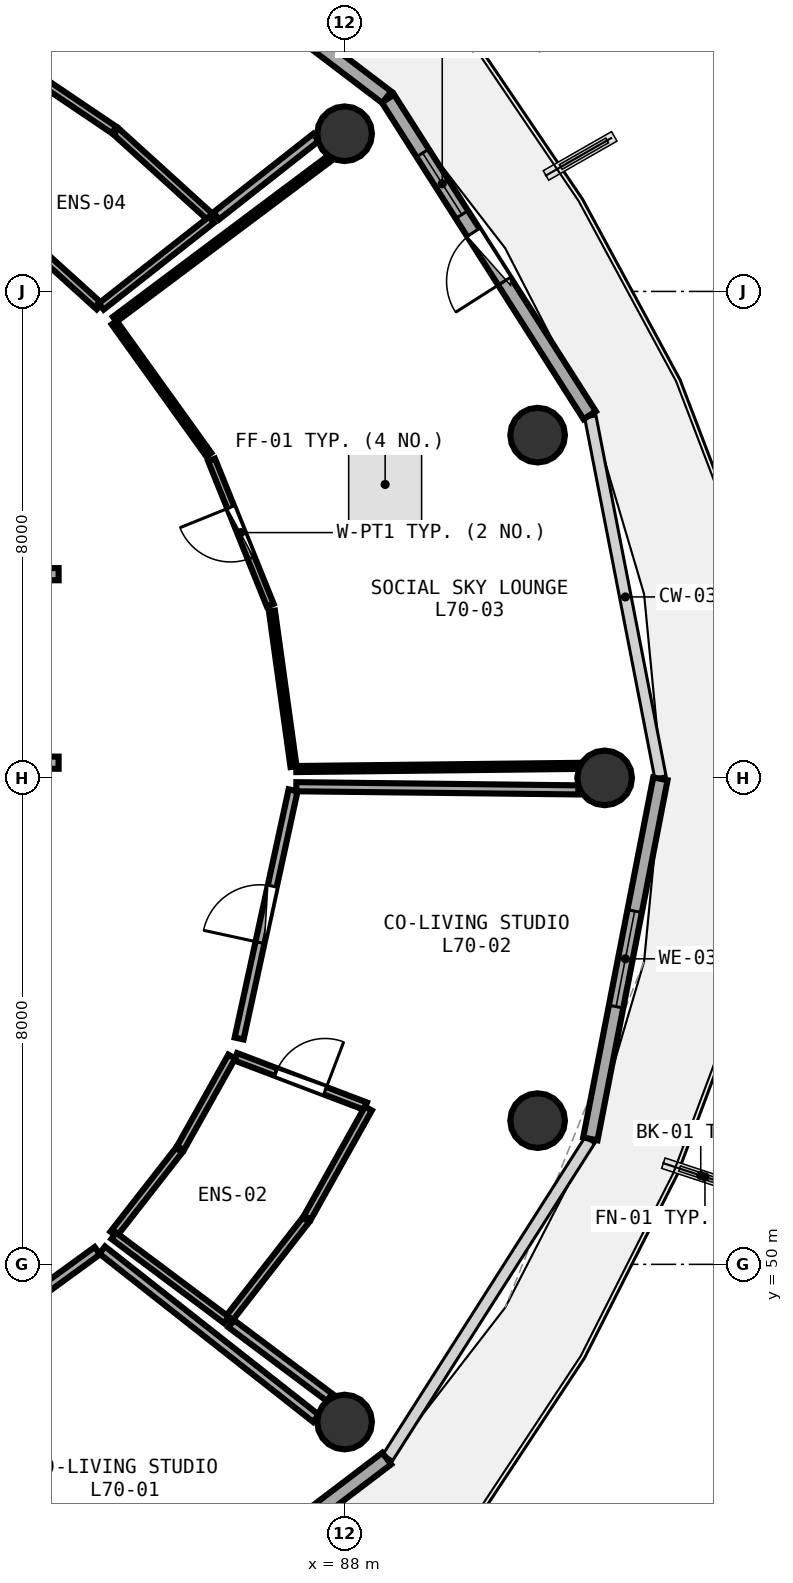
"""IFC4 building model, lengths in metres.
Left out: names, types, materials, properties, quantities, classifications, styles, units other than length and angle.
Written with IfcOpenShell. Run it as: python <this file> out.ifc"""

import sys

from ifc_helpers import new_model, si_unit, direction, frame, frame_2d, origin, origin_2d, place, context, subcontext, project, spatial, rectangle, circle, extrude, element, fill, save


model = new_model("IFC4")
c1 = context("Model", 3, precision=1e-05, world=origin(), true_north=direction((0.0, 1.0)))
c2 = subcontext(c1, "Body", "Model", "MODEL_VIEW")
j1 = project(units=[si_unit("LENGTHUNIT", "METRE"), si_unit("PLANEANGLEUNIT", "RADIAN")], contexts=[c1])
p1 = place(None, origin())
s1 = spatial("IfcSite", under=j1, at=p1, CompositionType="ELEMENT")
p2 = place(p1, origin())
s2 = spatial("IfcBuilding", under=s1, at=p2, CompositionType="ELEMENT")
p3 = place(p2, frame((0.0, 0.0, 274.95)))
s3 = spatial("IfcBuildingStorey", under=s2, at=p3, CompositionType="ELEMENT", Elevation=274.95)
for number, where, z_axis, x_axis in (
    (1, (92.28, 58.0, 0.0), (0.0, 0.0, 1.0), (1.0, 0.0, 0.0)),
    (2, (91.177, 63.636, 0.0), (0.0, 0.0, 1.0), (1.0, 0.0, 0.0)),
    (3, (88.003, 68.593, 0.0), (0.0, 0.0, 1.0), (1.0, 0.0, 0.0)),
    (4, (88.003, 47.407, 0.0), (0.0, 0.0, 1.0), (1.0, 0.0, 0.0)),
    (5, (91.177, 52.364, 0.0), (0.0, 0.0, 1.0), (1.0, 0.0, 0.0)),
):
    element("IfcColumn", number, at=place(p3, frame(where, z_axis=z_axis, x_axis=x_axis)), inside=s3, PredefinedType="COLUMN", context=c2, shape_type="SweptSolid", body=[
        extrude(circle(Radius=0.45, at=origin_2d()), origin(), (0.0, 0.0, 1.0), 3.75),
    ])
p4 = place(p3, frame((92.034, 63.964, 0.0), z_axis=(0.0, 0.0, 1.0), x_axis=(-0.537271968456, 0.843409053728, 0.0)))
e6 = element("IfcWall", 6, at=p4, inside=s3, PredefinedType="SOLIDWALL", context=c2, shape_type="SweptSolid", body=[
    extrude(rectangle(XDim=6.175, YDim=0.24, at=frame_2d((3.087, 0.0))), origin(), (0.0, 0.0, 1.0), 3.475),
])
p5 = place(p4, frame((2.613, 0.0, 0.0)))
e7 = element("IfcOpeningElement", 7, at=p5, cuts=e6, PredefinedType="OPENING", context=c2, shape_type="SweptSolid", body=[
    extrude(rectangle(XDim=0.95, YDim=2.1, at=frame_2d((0.475, 1.05))), frame((0.0, 0.13, 0.0), z_axis=(0.0, -1.0, 0.0), x_axis=(1.0, 0.0, 0.0)), (0.0, 0.0, 1.0), 0.26),
])
p6 = place(p4, frame((3.913, 0.0, 0.85)))
e8 = element("IfcOpeningElement", 8, at=p6, cuts=e6, PredefinedType="OPENING", context=c2, shape_type="SweptSolid", body=[
    extrude(rectangle(XDim=1.2, YDim=1.45, at=frame_2d((0.6, 0.725))), frame((0.0, 0.13, 0.0), z_axis=(0.0, -1.0, 0.0), x_axis=(1.0, 0.0, 0.0)), (0.0, 0.0, 1.0), 0.26),
])
p7 = place(p3, frame((88.696, 69.194, 0.0), z_axis=(0.0, 0.0, 1.0), x_axis=(-0.796010444211, 0.605282886514, 0.0)))
e9 = element("IfcWall", 9, at=p7, inside=s3, PredefinedType="SOLIDWALL", context=c2, shape_type="SweptSolid", body=[
    extrude(rectangle(XDim=6.387, YDim=0.24, at=frame_2d((3.194, 0.0))), origin(), (0.0, 0.0, 1.0), 3.475),
])
p8 = place(p7, frame((2.719, 0.0, 0.0)))
e10 = element("IfcOpeningElement", 10, at=p8, cuts=e9, PredefinedType="OPENING", context=c2, shape_type="SweptSolid", body=[
    extrude(rectangle(XDim=0.95, YDim=2.1, at=frame_2d((0.475, 1.05))), frame((0.0, 0.13, 0.0), z_axis=(0.0, -1.0, 0.0), x_axis=(1.0, 0.0, 0.0)), (0.0, 0.0, 1.0), 0.26),
])
p9 = place(p7, frame((4.019, 0.0, 0.85)))
e11 = element("IfcOpeningElement", 11, at=p9, cuts=e9, PredefinedType="OPENING", context=c2, shape_type="SweptSolid", body=[
    extrude(rectangle(XDim=1.2, YDim=1.45, at=frame_2d((0.6, 0.725))), frame((0.0, 0.13, 0.0), z_axis=(0.0, -1.0, 0.0), x_axis=(1.0, 0.0, 0.0)), (0.0, 0.0, 1.0), 0.26),
])
p10 = place(p3, frame((83.612, 42.94, 0.0), z_axis=(0.0, 0.0, 1.0), x_axis=(0.796010444211, 0.605282886514, 0.0)))
e12 = element("IfcWall", 12, at=p10, inside=s3, PredefinedType="SOLIDWALL", context=c2, shape_type="SweptSolid", body=[
    extrude(rectangle(XDim=6.387, YDim=0.24, at=frame_2d((3.194, 0.0))), origin(), (0.0, 0.0, 1.0), 3.475),
])
p11 = place(p10, frame((2.394, 0.0, 0.85)))
e13 = element("IfcOpeningElement", 13, at=p11, cuts=e12, PredefinedType="OPENING", context=c2, shape_type="SweptSolid", body=[
    extrude(rectangle(XDim=1.6, YDim=1.45, at=frame_2d((0.8, 0.725))), frame((0.0, 0.13, 0.0), z_axis=(0.0, -1.0, 0.0), x_axis=(1.0, 0.0, 0.0)), (0.0, 0.0, 1.0), 0.26),
])
p12 = place(p3, frame((92.045, 52.063, 0.0), z_axis=(0.0, 0.0, 1.0), x_axis=(0.190969309115, 0.981596008028, 0.0)))
e14 = element("IfcWall", 14, at=p12, inside=s3, PredefinedType="SOLIDWALL", context=c2, shape_type="SweptSolid", body=[
    extrude(rectangle(XDim=6.033, YDim=0.24, at=frame_2d((3.017, 0.0))), origin(), (0.0, 0.0, 1.0), 3.475),
])
p13 = place(p12, frame((2.216, 0.0, 0.85)))
e15 = element("IfcOpeningElement", 15, at=p13, cuts=e14, PredefinedType="OPENING", context=c2, shape_type="SweptSolid", body=[
    extrude(rectangle(XDim=1.6, YDim=1.45, at=frame_2d((0.8, 0.725))), frame((0.0, 0.13, 0.0), z_axis=(0.0, -1.0, 0.0), x_axis=(1.0, 0.0, 0.0)), (0.0, 0.0, 1.0), 0.26),
])
p14 = place(p3, frame((79.3, 61.35, 0.0), z_axis=(0.0, 0.0, 1.0), x_axis=(1.0, 0.0, 0.0)))
e16 = element("IfcWall", 16, at=p14, inside=s3, PredefinedType="SOLIDWALL", context=c2, shape_type="SweptSolid", body=[
    extrude(rectangle(XDim=4.0, YDim=0.2, at=frame_2d((2.0, 0.0))), origin(), (0.0, 0.0, 1.0), 2.775),
])
p15 = place(p14, frame((0.45, 0.0, 0.0)))
e17 = element("IfcOpeningElement", 17, at=p15, cuts=e16, PredefinedType="OPENING", context=c2, shape_type="SweptSolid", body=[
    extrude(rectangle(XDim=1.2, YDim=2.15, at=frame_2d((0.6, 1.075))), frame((0.0, 0.11, 0.0), z_axis=(0.0, -1.0, 0.0), x_axis=(1.0, 0.0, 0.0)), (0.0, 0.0, 1.0), 0.22),
])
p16 = place(p3, frame((79.3, 58.25, 0.0), z_axis=(0.0, 0.0, 1.0), x_axis=(1.0, 0.0, 0.0)))
e18 = element("IfcWall", 18, at=p16, inside=s3, PredefinedType="SOLIDWALL", context=c2, shape_type="SweptSolid", body=[
    extrude(rectangle(XDim=4.0, YDim=0.2, at=frame_2d((2.0, 0.0))), origin(), (0.0, 0.0, 1.0), 2.775),
])
p17 = place(p16, frame((0.5, 0.0, 0.0)))
e19 = element("IfcOpeningElement", 19, at=p17, cuts=e18, PredefinedType="OPENING", context=c2, shape_type="SweptSolid", body=[
    extrude(rectangle(XDim=1.1, YDim=2.1, at=frame_2d((0.55, 1.05))), frame((0.0, 0.11, 0.0), z_axis=(0.0, -1.0, 0.0), x_axis=(1.0, 0.0, 0.0)), (0.0, 0.0, 1.0), 0.22),
])
p18 = place(p3, frame((80.34, 47.607, 0.0), z_axis=(0.0, 0.0, 1.0), x_axis=(0.808603155837, 0.588354430909, 0.0)))
e20 = element("IfcWall", 20, at=p18, inside=s3, PredefinedType="PARTITIONING", context=c2, shape_type="SweptSolid", body=[
    extrude(rectangle(XDim=4.448, YDim=0.15, at=frame_2d((2.224, 0.0))), origin(), (0.0, 0.0, 1.0), 3.075),
])
p19 = place(p18, frame((1.749, 0.0, 0.0)))
e21 = element("IfcOpeningElement", 21, at=p19, cuts=e20, PredefinedType="OPENING", context=c2, shape_type="SweptSolid", body=[
    extrude(rectangle(XDim=0.95, YDim=2.08, at=frame_2d((0.475, 1.04))), frame((0.0, 0.085, 0.0), z_axis=(0.0, -1.0, 0.0), x_axis=(1.0, 0.0, 0.0)), (0.0, 0.0, 1.0), 0.17),
])
p20 = place(p3, frame((86.213, 53.414, 0.0), z_axis=(0.0, 0.0, 1.0), x_axis=(0.934596057468, -0.355710850784, 0.0)))
e22 = element("IfcWall", 22, at=p20, inside=s3, PredefinedType="PLUMBINGWALL", context=c2, shape_type="SweptSolid", body=[
    extrude(rectangle(XDim=2.284, YDim=0.13, at=frame_2d((1.142, 0.0))), origin(), (0.0, 0.0, 1.0), 3.175),
])
p21 = place(p20, frame((0.712, 0.0, 0.0)))
e23 = element("IfcOpeningElement", 23, at=p21, cuts=e22, PredefinedType="OPENING", context=c2, shape_type="SweptSolid", body=[
    extrude(rectangle(XDim=0.86, YDim=2.05, at=frame_2d((0.43, 1.025))), frame((0.0, 0.075, 0.0), z_axis=(0.0, -1.0, 0.0), x_axis=(1.0, 0.0, 0.0)), (0.0, 0.0, 1.0), 0.15),
])
p22 = place(p3, frame((86.269, 53.715, 0.0), z_axis=(0.0, 0.0, 1.0), x_axis=(0.212453909159, 0.977171088645, 0.0)))
e24 = element("IfcWall", 24, at=p22, inside=s3, PredefinedType="PARTITIONING", context=c2, shape_type="SweptSolid", body=[
    extrude(rectangle(XDim=4.177, YDim=0.15, at=frame_2d((2.089, 0.0))), origin(), (0.0, 0.0, 1.0), 3.48),
])
p23 = place(p22, frame((1.614, 0.0, 0.0)))
e25 = element("IfcOpeningElement", 25, at=p23, cuts=e24, PredefinedType="OPENING", context=c2, shape_type="SweptSolid", body=[
    extrude(rectangle(XDim=0.95, YDim=2.08, at=frame_2d((0.475, 1.04))), frame((0.0, 0.085, 0.0), z_axis=(0.0, -1.0, 0.0), x_axis=(1.0, 0.0, 0.0)), (0.0, 0.0, 1.0), 0.17),
])
p24 = place(p3, frame((86.781, 60.84, 0.0), z_axis=(0.0, 0.0, 1.0), x_axis=(-0.374574284654, 0.927196907499, 0.0)))
e26 = element("IfcWall", 26, at=p24, inside=s3, PredefinedType="PARTITIONING", context=c2, shape_type="SweptSolid", body=[
    extrude(rectangle(XDim=2.576, YDim=0.12, at=frame_2d((1.288, 0.0))), origin(), (0.0, 0.0, 1.0), 3.48),
])
p25 = place(p24, frame((0.838, 0.0, 0.0)))
e27 = element("IfcOpeningElement", 27, at=p25, cuts=e26, PredefinedType="OPENING", context=c2, shape_type="SweptSolid", body=[
    extrude(rectangle(XDim=0.9, YDim=2.08, at=frame_2d((0.45, 1.04))), frame((0.0, 0.07, 0.0), z_axis=(0.0, -1.0, 0.0), x_axis=(1.0, 0.0, 0.0)), (0.0, 0.0, 1.0), 0.14),
])
p26 = place(p3, frame((84.016, 50.235, 0.0), z_axis=(0.0, 0.0, 1.0), x_axis=(0.785736749878, -0.618561039745, 0.0)))
e28 = element("IfcWall", 28, at=p26, inside=s3, PredefinedType="PARTITIONING", context=c2, shape_type="SweptSolid", body=[
    extrude(rectangle(XDim=4.475, YDim=0.15, at=frame_2d((2.237, 0.0))), origin(), (0.0, 0.0, 1.0), 3.075),
])
p27 = place(p3, frame((84.203, 50.498, 0.0), z_axis=(0.0, 0.0, 1.0), x_axis=(0.615627813602, 0.78803705187, 0.0)))
e29 = element("IfcWall", 29, at=p27, inside=s3, PredefinedType="PLUMBINGWALL", context=c2, shape_type="SweptSolid", body=[
    extrude(rectangle(XDim=1.752, YDim=0.13, at=frame_2d((0.876, 0.0))), origin(), (0.0, 0.0, 1.0), 3.075),
])
p28 = place(p3, frame((85.304, 51.911, 0.0), z_axis=(0.0, 0.0, 1.0), x_axis=(0.488642128311, 0.872484309566, 0.0)))
e30 = element("IfcWall", 30, at=p28, inside=s3, PredefinedType="PLUMBINGWALL", context=c2, shape_type="SweptSolid", body=[
    extrude(rectangle(XDim=1.726, YDim=0.13, at=frame_2d((0.863, 0.0))), origin(), (0.0, 0.0, 1.0), 3.235),
])
p29 = place(p3, frame((88.394, 52.562, 0.0), z_axis=(0.0, 0.0, 1.0), x_axis=(-0.487959720546, -0.872866147313, 0.0)))
e31 = element("IfcWall", 31, at=p29, inside=s3, PredefinedType="PLUMBINGWALL", context=c2, shape_type="SweptSolid", body=[
    extrude(rectangle(XDim=2.056, YDim=0.13, at=frame_2d((1.028, 0.0))), origin(), (0.0, 0.0, 1.0), 3.075),
])
p30 = place(p3, frame((87.369, 50.734, 0.0), z_axis=(0.0, 0.0, 1.0), x_axis=(-0.614418714287, -0.788980128732, 0.0)))
e32 = element("IfcWall", 32, at=p30, inside=s3, PredefinedType="PLUMBINGWALL", context=c2, shape_type="SweptSolid", body=[
    extrude(rectangle(XDim=2.085, YDim=0.13, at=frame_2d((1.042, 0.0))), origin(), (0.0, 0.0, 1.0), 3.48),
])
p31 = place(p3, frame((86.059, 49.085, 0.0), z_axis=(0.0, 0.0, 1.0), x_axis=(-0.800835318147, 0.598884624288, 0.0)))
e33 = element("IfcWall", 33, at=p31, inside=s3, PredefinedType="PLUMBINGWALL", context=c2, shape_type="SweptSolid", body=[
    extrude(rectangle(XDim=2.313, YDim=0.13, at=frame_2d((1.156, 0.0))), origin(), (0.0, 0.0, 1.0), 3.175),
])
p32 = place(p3, frame((87.209, 57.854, 0.0), z_axis=(0.0, 0.0, 1.0), x_axis=(0.999937174585, -0.01120923205, 0.0)))
e34 = element("IfcWall", 34, at=p32, inside=s3, PredefinedType="PARTITIONING", context=c2, shape_type="SweptSolid", body=[
    extrude(rectangle(XDim=4.639, YDim=0.15, at=frame_2d((2.32, 0.0))), origin(), (0.0, 0.0, 1.0), 3.075),
])
p33 = place(p3, frame((87.756, 47.812, 0.0), z_axis=(0.0, 0.0, 1.0), x_axis=(-0.800376717426, 0.599497381314, 0.0)))
e35 = element("IfcWall", 35, at=p33, inside=s3, PredefinedType="PARTITIONING", context=c2, shape_type="SweptSolid", body=[
    extrude(rectangle(XDim=2.021, YDim=0.15, at=frame_2d((1.011, 0.0))), origin(), (0.0, 0.0, 1.0), 3.235),
])
p34 = place(p3, frame((87.164, 58.185, 0.0), z_axis=(0.0, 0.0, 1.0), x_axis=(-0.137359832701, 0.990521214493, 0.0)))
e36 = element("IfcWall", 36, at=p34, inside=s3, PredefinedType="PARTITIONING", context=c2, shape_type="SweptSolid", body=[
    extrude(rectangle(XDim=2.584, YDim=0.1, at=frame_2d((1.292, 0.0))), origin(), (0.0, 0.0, 1.0), 3.48),
])
p35 = place(p3, frame((85.77, 63.316, 0.0), z_axis=(0.0, 0.0, 1.0), x_axis=(-0.582725386778, 0.812669135383, 0.0)))
e37 = element("IfcWall", 37, at=p35, inside=s3, PredefinedType="PARTITIONING", context=c2, shape_type="SweptSolid", body=[
    extrude(rectangle(XDim=2.669, YDim=0.1, at=frame_2d((1.334, 0.0))), origin(), (0.0, 0.0, 1.0), 3.075),
])
p36 = place(p3, frame((84.223, 65.542, 0.0), z_axis=(0.0, 0.0, 1.0), x_axis=(0.800384816546, 0.599486568191, 0.0)))
e38 = element("IfcWall", 38, at=p36, inside=s3, PredefinedType="PARTITIONING", context=c2, shape_type="SweptSolid", body=[
    extrude(rectangle(XDim=4.414, YDim=0.1, at=frame_2d((2.207, 0.0))), origin(), (0.0, 0.0, 1.0), 3.175),
])
p37 = place(p3, frame((91.848, 58.198, 0.0), z_axis=(0.0, 0.0, 1.0), x_axis=(-0.999937174585, -0.01120923205, 0.0)))
e39 = element("IfcWall", 39, at=p37, inside=s3, PredefinedType="PARTITIONING", context=c2, shape_type="SweptSolid", body=[
    extrude(rectangle(XDim=4.639, YDim=0.1, at=frame_2d((2.32, 0.0))), origin(), (0.0, 0.0, 1.0), 3.075),
])
p38 = place(p3, frame((83.97, 65.753, 0.0), z_axis=(0.0, 0.0, 1.0), x_axis=(-0.741337974143, 0.671131885767, 0.0)))
e40 = element("IfcWall", 40, at=p38, inside=s3, PredefinedType="PLUMBINGWALL", context=c2, shape_type="SweptSolid", body=[
    extrude(rectangle(XDim=1.784, YDim=0.13, at=frame_2d((0.892, 0.0))), origin(), (0.0, 0.0, 1.0), 3.075),
])
p39 = place(p3, frame((82.427, 69.86, 0.0), z_axis=(0.0, 0.0, 1.0), x_axis=(0.828897302699, -0.559400805843, 0.0)))
e41 = element("IfcWall", 41, at=p39, inside=s3, PredefinedType="PLUMBINGWALL", context=c2, shape_type="SweptSolid", body=[
    extrude(rectangle(XDim=2.153, YDim=0.13, at=frame_2d((1.077, 0.0))), origin(), (0.0, 0.0, 1.0), 3.075),
])
p40 = place(p3, frame((84.244, 68.631, 0.0), z_axis=(0.0, 0.0, 1.0), x_axis=(0.740450028949, -0.672111415339, 0.0)))
e42 = element("IfcWall", 42, at=p40, inside=s3, PredefinedType="PLUMBINGWALL", context=c2, shape_type="SweptSolid", body=[
    extrude(rectangle(XDim=2.122, YDim=0.13, at=frame_2d((1.061, 0.0))), origin(), (0.0, 0.0, 1.0), 3.075),
])
p41 = place(p3, frame((85.814, 67.179, 0.0), z_axis=(0.0, 0.0, 1.0), x_axis=(-0.786024493366, -0.618195354098, 0.0)))
e43 = element("IfcWall", 43, at=p41, inside=s3, PredefinedType="PLUMBINGWALL", context=c2, shape_type="SweptSolid", body=[
    extrude(rectangle(XDim=2.307, YDim=0.13, at=frame_2d((1.154, 0.0))), origin(), (0.0, 0.0, 1.0), 3.075),
])
p42 = place(p3, frame((87.532, 68.533, 0.0), z_axis=(0.0, 0.0, 1.0), x_axis=(-0.785863630792, -0.618399833278, 0.0)))
e44 = element("IfcWall", 44, at=p42, inside=s3, PredefinedType="PARTITIONING", context=c2, shape_type="SweptSolid", body=[
    extrude(rectangle(XDim=2.088, YDim=0.15, at=frame_2d((1.044, 0.0))), origin(), (0.0, 0.0, 1.0), 3.075),
])
p43 = place(p5, frame((0.95, 0.0, 0.0), z_axis=(0.0, 0.0, 1.0), x_axis=(-1.0, 0.0, 0.0)))
e45 = element("IfcDoor", 45, at=p43, inside=s3, OperationType="SINGLE_SWING_RIGHT", PredefinedType="DOOR", context=c2, shape_type="SweptSolid", body=[
    extrude(rectangle(XDim=0.95, YDim=2.1, at=frame_2d((0.475, 1.05))), frame((0.0, 0.025, 0.0), z_axis=(0.0, -1.0, 0.0), x_axis=(1.0, 0.0, 0.0)), (0.0, 0.0, 1.0), 0.05),
])
fill(e7, e45)
p44 = place(p6, origin())
e46 = element("IfcWindow", 46, at=p44, inside=s3, PartitioningType="SINGLE_PANEL", PredefinedType="WINDOW", context=c2, shape_type="SweptSolid", body=[
    extrude(rectangle(XDim=1.2, YDim=1.45, at=frame_2d((0.6, 0.725))), frame((0.0, 0.03, 0.0), z_axis=(0.0, -1.0, 0.0), x_axis=(1.0, 0.0, 0.0)), (0.0, 0.0, 1.0), 0.06),
])
fill(e8, e46)
p45 = place(p13, origin())
e47 = element("IfcWindow", 47, at=p45, inside=s3, PartitioningType="SINGLE_PANEL", PredefinedType="WINDOW", context=c2, shape_type="SweptSolid", body=[
    extrude(rectangle(XDim=1.6, YDim=1.45, at=frame_2d((0.8, 0.725))), frame((0.0, 0.03, 0.0), z_axis=(0.0, -1.0, 0.0), x_axis=(1.0, 0.0, 0.0)), (0.0, 0.0, 1.0), 0.06),
])
fill(e15, e47)
p46 = place(p21, origin())
e48 = element("IfcDoor", 48, at=p46, inside=s3, OperationType="SINGLE_SWING_RIGHT", PredefinedType="DOOR", context=c2, shape_type="SweptSolid", body=[
    extrude(rectangle(XDim=0.86, YDim=2.05, at=frame_2d((0.43, 1.025))), frame((0.0, 0.025, 0.0), z_axis=(0.0, -1.0, 0.0), x_axis=(1.0, 0.0, 0.0)), (0.0, 0.0, 1.0), 0.05),
])
fill(e23, e48)
p47 = place(p23, origin())
e49 = element("IfcDoor", 49, at=p47, inside=s3, OperationType="SINGLE_SWING_LEFT", PredefinedType="DOOR", context=c2, shape_type="SweptSolid", body=[
    extrude(rectangle(XDim=0.95, YDim=2.08, at=frame_2d((0.475, 1.04))), frame((0.0, 0.025, 0.0), z_axis=(0.0, -1.0, 0.0), x_axis=(1.0, 0.0, 0.0)), (0.0, 0.0, 1.0), 0.05),
])
fill(e25, e49)
p48 = place(p25, origin())
e50 = element("IfcDoor", 50, at=p48, inside=s3, OperationType="SINGLE_SWING_RIGHT", PredefinedType="DOOR", context=c2, shape_type="SweptSolid", body=[
    extrude(rectangle(XDim=0.9, YDim=2.08, at=frame_2d((0.45, 1.04))), frame((0.0, 0.025, 0.0), z_axis=(0.0, -1.0, 0.0), x_axis=(1.0, 0.0, 0.0)), (0.0, 0.0, 1.0), 0.05),
])
fill(e27, e50)
save(model, sys.argv[1])
